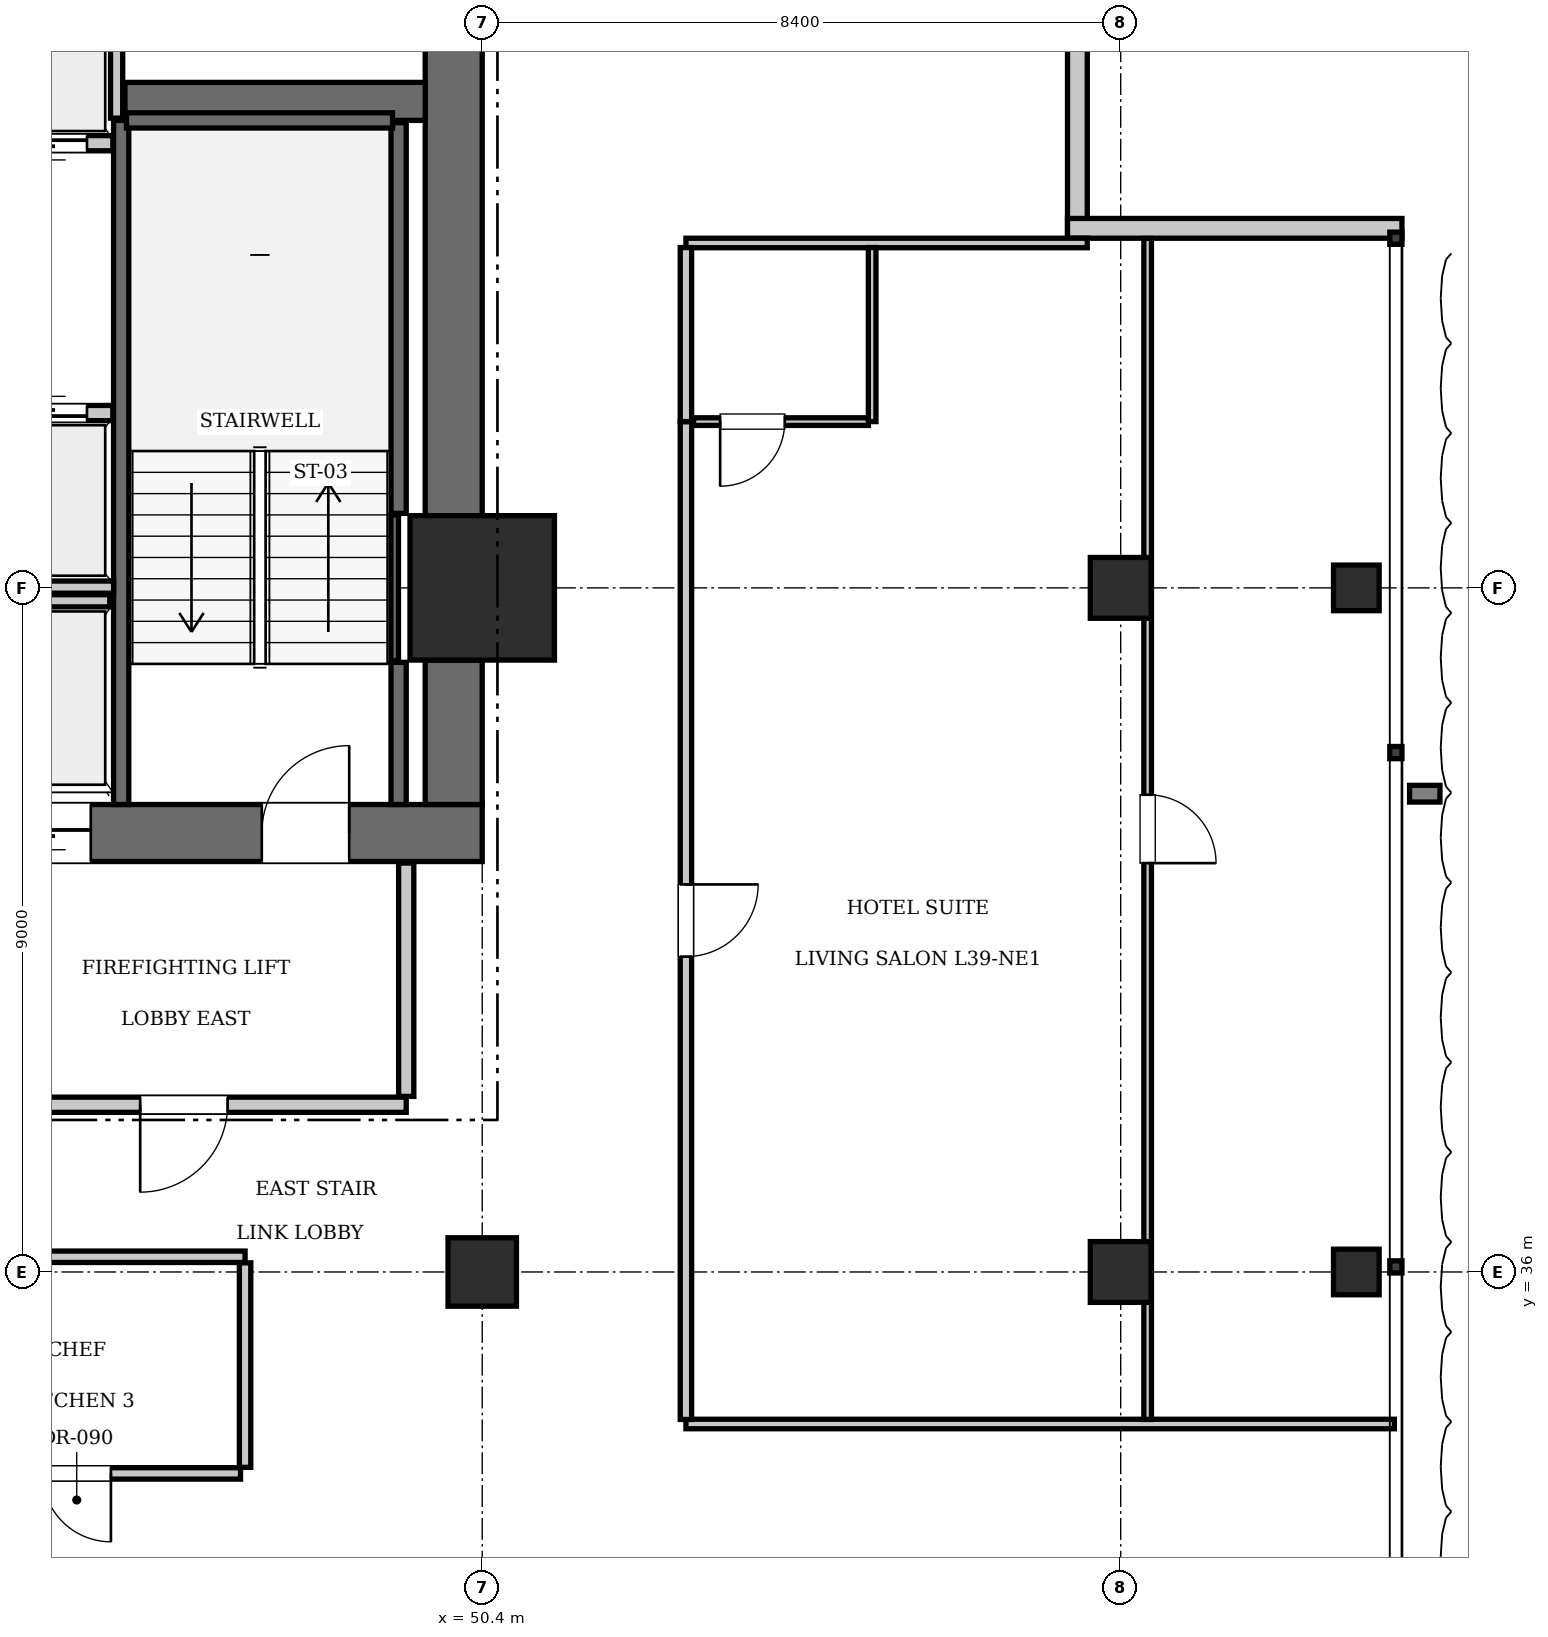
"""IFC4 building model, lengths in metres.
Left out: names, types, materials, properties, quantities, classifications, styles, units other than length and angle.
Written with IfcOpenShell. Run it as: python <this file> out.ifc"""

import sys

from ifc_helpers import new_model, si_unit, direction, frame, frame_2d, origin, origin_2d, place, context, subcontext, project, spatial, rectangle, i_section, extrude, element, fill, save


model = new_model("IFC4")
c1 = context("Model", 3, precision=1e-05, world=origin(), true_north=direction((0.0, 1.0)))
c2 = subcontext(c1, "Body", "Model", "MODEL_VIEW")
j1 = project(units=[si_unit("LENGTHUNIT", "METRE"), si_unit("PLANEANGLEUNIT", "RADIAN")], contexts=[c1])
p1 = place(None, origin())
s1 = spatial("IfcSite", under=j1, at=p1, CompositionType="ELEMENT")
p2 = place(p1, origin())
s2 = spatial("IfcBuilding", under=s1, at=p2, CompositionType="ELEMENT")
p3 = place(p2, frame((0.0, 0.0, 162.05)))
s3 = spatial("IfcBuildingStorey", under=s2, at=p3, CompositionType="ELEMENT", Elevation=162.05)
p4 = place(p3, frame((50.4, 45.0, 0.0), z_axis=(0.0, 0.0, 1.0), x_axis=(1.0, 0.0, 0.0)))
e1 = element("IfcColumn", 1, at=p4, inside=s3, PredefinedType="COLUMN", context=c2, shape_type="SweptSolid", body=[
    extrude(rectangle(XDim=1.9, YDim=1.9, at=origin_2d()), origin(), (0.0, 0.0, 1.0), 3.85),
])
p5 = place(p3, frame((43.6, 41.775, 0.0), z_axis=(0.0, 0.0, 1.0), x_axis=(1.0, 0.0, 0.0)))
e2 = element("IfcWall", 2, at=p5, inside=s3, PredefinedType="SHEAR", context=c2, shape_type="SweptSolid", body=[
    extrude(rectangle(XDim=6.8, YDim=0.75, at=frame_2d((3.4, 0.0))), origin(), (0.0, 0.0, 1.0), 3.85),
])
p6 = place(p5, frame((3.9, 0.0, 0.0)))
e3 = element("IfcOpeningElement", 3, at=p6, cuts=e2, PredefinedType="OPENING", context=c2, shape_type="SweptSolid", body=[
    extrude(rectangle(XDim=1.15, YDim=2.15, at=frame_2d((0.575, 1.075))), frame((0.0, 0.385, 0.0), z_axis=(0.0, -1.0, 0.0), x_axis=(1.0, 0.0, 0.0)), (0.0, 0.0, 1.0), 0.77),
])
p7 = place(p5, frame((0.55, 0.0, 0.0)))
e4 = element("IfcOpeningElement", 4, at=p7, cuts=e2, PredefinedType="OPENING", context=c2, shape_type="SweptSolid", body=[
    extrude(rectangle(XDim=1.1, YDim=2.2, at=frame_2d((0.55, 1.1))), frame((0.0, 0.385, 0.0), z_axis=(0.0, -1.0, 0.0), x_axis=(1.0, 0.0, 0.0)), (0.0, 0.0, 1.0), 0.77),
])
p8 = place(p3, frame((50.025, 42.15, 0.0), z_axis=(0.0, 0.0, 1.0), x_axis=(0.0, 1.0, 0.0)))
e5 = element("IfcWall", 5, at=p8, inside=s3, PredefinedType="SHEAR", context=c2, shape_type="SweptSolid", body=[
    extrude(rectangle(XDim=1.9, YDim=0.75, at=frame_2d((0.95, 0.0))), origin(), (0.0, 0.0, 1.0), 3.85),
])
p9 = place(p3, frame((50.025, 45.95, 0.0), z_axis=(0.0, 0.0, 1.0), x_axis=(0.0, 1.0, 0.0)))
e6 = element("IfcWall", 6, at=p9, inside=s3, PredefinedType="SHEAR", context=c2, shape_type="SweptSolid", body=[
    extrude(rectangle(XDim=7.3, YDim=0.75, at=frame_2d((3.65, 0.0))), origin(), (0.0, 0.0, 1.0), 3.85),
])
p10 = place(p3, frame((45.7, 51.4, 0.0), z_axis=(0.0, 0.0, 1.0), x_axis=(1.0, 0.0, 0.0)))
e7 = element("IfcWall", 7, at=p10, inside=s3, PredefinedType="SHEAR", context=c2, shape_type="SweptSolid", body=[
    extrude(rectangle(XDim=3.95, YDim=0.5, at=frame_2d((1.975, 0.0))), origin(), (0.0, 0.0, 1.0), 3.85),
])
p11 = place(p3, frame((50.4, 36.0, 0.0), z_axis=(0.0, 0.0, 1.0), x_axis=(1.0, 0.0, 0.0)))
e8 = element("IfcColumn", 8, at=p11, inside=s3, PredefinedType="COLUMN", context=c2, shape_type="SweptSolid", body=[
    extrude(rectangle(XDim=0.9, YDim=0.9, at=origin_2d()), origin(), (0.0, 0.0, 1.0), 3.85),
])
for number, where, z_axis, x_axis in (
    (9, (58.8, 36.0, 0.0), (0.0, 0.0, 1.0), (1.0, 0.0, 0.0)),
    (10, (58.8, 45.0, 0.0), (0.0, 0.0, 1.0), (1.0, 0.0, 0.0)),
):
    element("IfcColumn", number, at=place(p3, frame(where, z_axis=z_axis, x_axis=x_axis)), inside=s3, PredefinedType="COLUMN", context=c2, shape_type="SweptSolid", body=[
        extrude(rectangle(XDim=0.8, YDim=0.8, at=origin_2d()), origin(), (0.0, 0.0, 1.0), 3.85),
    ])
for number, where, z_axis, x_axis in (
    (11, (61.9, 36.0, 0.0), (0.0, 0.0, 1.0), (1.0, 0.0, 0.0)),
    (12, (61.9, 45.0, 0.0), (0.0, 0.0, 1.0), (1.0, 0.0, 0.0)),
):
    element("IfcColumn", number, at=place(p3, frame(where, z_axis=z_axis, x_axis=x_axis)), inside=s3, PredefinedType="COLUMN", context=c2, shape_type="SweptSolid", body=[
        extrude(i_section(OverallWidth=0.6, OverallDepth=0.6, WebThickness=0.025, FlangeThickness=0.038, at=origin_2d()), origin(), (0.0, 0.0, 1.0), 3.85),
    ])
p12 = place(p3, frame((45.65, 42.15, 0.0), z_axis=(0.0, 0.0, 1.0), x_axis=(0.0, 1.0, 0.0)))
e13 = element("IfcWall", 13, at=p12, inside=s3, PredefinedType="SOLIDWALL", context=c2, shape_type="SweptSolid", body=[
    extrude(rectangle(XDim=9.0, YDim=0.2, at=frame_2d((4.5, 0.0))), origin(), (0.0, 0.0, 1.0), 3.61),
])
p13 = place(p3, frame((49.3, 42.15, 0.0), z_axis=(0.0, 0.0, 1.0), x_axis=(0.0, 1.0, 0.0)))
e14 = element("IfcWall", 14, at=p13, inside=s3, PredefinedType="SOLIDWALL", context=c2, shape_type="SweptSolid", body=[
    extrude(rectangle(XDim=1.87, YDim=0.2, at=frame_2d((0.935, 0.0))), origin(), (0.0, 0.0, 1.0), 3.61),
])
p14 = place(p3, frame((49.3, 45.98, 0.0), z_axis=(0.0, 0.0, 1.0), x_axis=(0.0, 1.0, 0.0)))
e15 = element("IfcWall", 15, at=p14, inside=s3, PredefinedType="SOLIDWALL", context=c2, shape_type="SweptSolid", body=[
    extrude(rectangle(XDim=5.14, YDim=0.2, at=frame_2d((2.57, 0.0))), origin(), (0.0, 0.0, 1.0), 3.61),
])
p15 = place(p3, frame((45.72, 51.15, 0.0), z_axis=(0.0, 0.0, 1.0), x_axis=(1.0, 0.0, 0.0)))
e16 = element("IfcWall", 16, at=p15, inside=s3, PredefinedType="SOLIDWALL", context=c2, shape_type="SweptSolid", body=[
    extrude(rectangle(XDim=3.5, YDim=0.2, at=frame_2d((1.75, 0.0))), origin(), (0.0, 0.0, 1.0), 3.61),
])
p16 = place(p3, frame((49.248, 44.04, 0.0), z_axis=(0.0, 0.0, 1.0), x_axis=(0.0, 1.0, 0.0)))
e17 = element("IfcWall", 17, at=p16, inside=s3, PredefinedType="SOLIDWALL", context=c2, shape_type="SweptSolid", body=[
    extrude(rectangle(XDim=1.92, YDim=0.1, at=frame_2d((0.96, 0.0))), origin(), (0.0, 0.0, 1.0), 3.61),
])
p17 = place(p3, frame((43.86, 47.3, 0.0), z_axis=(0.0, 0.0, 1.0), x_axis=(1.0, 0.0, 0.0)))
e18 = element("IfcWall", 18, at=p17, inside=s3, PredefinedType="SOLIDWALL", context=c2, shape_type="SweptSolid", body=[
    extrude(rectangle(XDim=1.68, YDim=0.2, at=frame_2d((0.84, 0.0))), origin(), (0.0, 0.0, 1.0), 3.61),
])
p18 = place(p17, frame((0.34, 0.0, 0.0)))
e19 = element("IfcOpeningElement", 19, at=p18, cuts=e18, PredefinedType="OPENING", context=c2, shape_type="SweptSolid", body=[
    extrude(rectangle(XDim=1.0, YDim=2.15, at=frame_2d((0.5, 1.075))), frame((0.0, 0.11, 0.0), z_axis=(0.0, -1.0, 0.0), x_axis=(1.0, 0.0, 0.0)), (0.0, 0.0, 1.0), 0.22),
])
p19 = place(p3, frame((43.86, 50.85, 0.0), z_axis=(0.0, 0.0, 1.0), x_axis=(1.0, 0.0, 0.0)))
e20 = element("IfcWall", 20, at=p19, inside=s3, PredefinedType="SOLIDWALL", context=c2, shape_type="SweptSolid", body=[
    extrude(rectangle(XDim=1.68, YDim=0.2, at=frame_2d((0.84, 0.0))), origin(), (0.0, 0.0, 1.0), 3.61),
])
p20 = place(p19, frame((0.34, 0.0, 0.0)))
e21 = element("IfcOpeningElement", 21, at=p20, cuts=e20, PredefinedType="OPENING", context=c2, shape_type="SweptSolid", body=[
    extrude(rectangle(XDim=1.0, YDim=2.15, at=frame_2d((0.5, 1.075))), frame((0.0, 0.11, 0.0), z_axis=(0.0, -1.0, 0.0), x_axis=(1.0, 0.0, 0.0)), (0.0, 0.0, 1.0), 0.22),
])
p21 = place(p3, frame((43.9, 44.83, 0.0), z_axis=(0.0, 0.0, 1.0), x_axis=(1.0, 0.0, 0.0)))
e22 = element("IfcWall", 22, at=p21, inside=s3, PredefinedType="SOLIDWALL", context=c2, shape_type="SweptSolid", body=[
    extrude(rectangle(XDim=1.6, YDim=0.16, at=frame_2d((0.8, 0.0))), origin(), (0.0, 0.0, 1.0), 3.61),
])
p22 = place(p3, frame((42.1, 45.01, 0.0), z_axis=(0.0, 0.0, 1.0), x_axis=(1.0, 0.0, 0.0)))
e23 = element("IfcWall", 23, at=p22, inside=s3, PredefinedType="SOLIDWALL", context=c2, shape_type="SweptSolid", body=[
    extrude(rectangle(XDim=3.45, YDim=0.16, at=frame_2d((1.725, 0.0))), origin(), (0.0, 0.0, 1.0), 3.61),
])
p23 = place(p3, frame((45.59, 51.18, 0.0), z_axis=(0.0, 0.0, 1.0), x_axis=(0.0, 1.0, 0.0)))
e24 = element("IfcWall", 24, at=p23, inside=s3, PredefinedType="SOLIDWALL", context=c2, shape_type="SweptSolid", body=[
    extrude(rectangle(XDim=2.07, YDim=0.16, at=frame_2d((1.035, 0.0))), origin(), (0.0, 0.0, 1.0), 3.61),
])
for number, where, z_axis, x_axis in (
    (25, (58.23, 54.0, 0.0), (0.0, 0.0, 1.0), (0.0, -1.0, 0.0)),
    (26, (58.1, 49.73, 0.0), (0.0, 0.0, 1.0), (1.0, 0.0, 0.0)),
):
    element("IfcWall", number, at=place(p3, frame(where, z_axis=z_axis, x_axis=x_axis)), inside=s3, PredefinedType="SOLIDWALL", context=c2, shape_type="SweptSolid", body=[
        extrude(rectangle(XDim=4.4, YDim=0.26, at=frame_2d((2.2, 0.0))), origin(), (0.0, 0.0, 1.0), 3.61),
    ])
p24 = place(p3, frame((43.6, 38.2, 0.0), z_axis=(0.0, 0.0, 1.0), x_axis=(1.0, 0.0, 0.0)))
e27 = element("IfcWall", 27, at=p24, inside=s3, PredefinedType="PARTITIONING", context=c2, shape_type="SweptSolid", body=[
    extrude(rectangle(XDim=5.8, YDim=0.2, at=frame_2d((2.9, 0.0))), origin(), (0.0, 0.0, 1.0), 3.61),
])
p25 = place(p24, frame((2.3, 0.0, 0.0)))
e28 = element("IfcOpeningElement", 28, at=p25, cuts=e27, PredefinedType="OPENING", context=c2, shape_type="SweptSolid", body=[
    extrude(rectangle(XDim=1.15, YDim=2.15, at=frame_2d((0.575, 1.075))), frame((0.0, 0.11, 0.0), z_axis=(0.0, -1.0, 0.0), x_axis=(1.0, 0.0, 0.0)), (0.0, 0.0, 1.0), 0.22),
])
p26 = place(p3, frame((49.4, 38.31, 0.0), z_axis=(0.0, 0.0, 1.0), x_axis=(0.0, 1.0, 0.0)))
e29 = element("IfcWall", 29, at=p26, inside=s3, PredefinedType="PARTITIONING", context=c2, shape_type="SweptSolid", body=[
    extrude(rectangle(XDim=3.07, YDim=0.2, at=frame_2d((1.535, 0.0))), origin(), (0.0, 0.0, 1.0), 3.61),
])
p27 = place(p3, frame((42.85, 36.2, 0.0), z_axis=(0.0, 0.0, 1.0), x_axis=(1.0, 0.0, 0.0)))
e30 = element("IfcWall", 30, at=p27, inside=s3, PredefinedType="PARTITIONING", context=c2, shape_type="SweptSolid", body=[
    extrude(rectangle(XDim=4.43, YDim=0.15, at=frame_2d((2.215, 0.0))), origin(), (0.0, 0.0, 1.0), 3.61),
])
p28 = place(p3, frame((47.28, 33.43, 0.0), z_axis=(0.0, 0.0, 1.0), x_axis=(0.0, 1.0, 0.0)))
e31 = element("IfcWall", 31, at=p28, inside=s3, PredefinedType="PARTITIONING", context=c2, shape_type="SweptSolid", body=[
    extrude(rectangle(XDim=2.69, YDim=0.15, at=frame_2d((1.345, 0.0))), origin(), (0.0, 0.0, 1.0), 3.61),
])
p29 = place(p3, frame((42.91, 33.35, 0.0), z_axis=(0.0, 0.0, 1.0), x_axis=(1.0, 0.0, 0.0)))
e32 = element("IfcWall", 32, at=p29, inside=s3, PredefinedType="PARTITIONING", context=c2, shape_type="SweptSolid", body=[
    extrude(rectangle(XDim=4.31, YDim=0.15, at=frame_2d((2.155, 0.0))), origin(), (0.0, 0.0, 1.0), 3.61),
])
p30 = place(p29, frame((1.705, 0.0, 0.0)))
e33 = element("IfcOpeningElement", 33, at=p30, cuts=e32, PredefinedType="OPENING", context=c2, shape_type="SweptSolid", body=[
    extrude(rectangle(XDim=0.9, YDim=2.1, at=frame_2d((0.45, 1.05))), frame((0.0, 0.085, 0.0), z_axis=(0.0, -1.0, 0.0), x_axis=(1.0, 0.0, 0.0)), (0.0, 0.0, 1.0), 0.17),
])
p31 = place(p3, frame((53.08, 34.0, 0.0), z_axis=(0.0, 0.0, 1.0), x_axis=(1.0, 0.0, 0.0)))
e34 = element("IfcWall", 34, at=p31, inside=s3, PredefinedType="PARTITIONING", context=c2, shape_type="SweptSolid", body=[
    extrude(rectangle(XDim=9.32, YDim=0.125, at=frame_2d((4.66, 0.0))), origin(), (0.0, 0.0, 1.0), 3.61),
])
p32 = place(p3, frame((53.08, 49.538, 0.0), z_axis=(0.0, 0.0, 1.0), x_axis=(1.0, 0.0, 0.0)))
e35 = element("IfcWall", 35, at=p32, inside=s3, PredefinedType="PARTITIONING", context=c2, shape_type="SweptSolid", body=[
    extrude(rectangle(XDim=5.28, YDim=0.125, at=frame_2d((2.64, 0.0))), origin(), (0.0, 0.0, 1.0), 3.61),
])
p33 = place(p3, frame((53.08, 34.06, 0.0), z_axis=(0.0, 0.0, 1.0), x_axis=(0.0, 1.0, 0.0)))
e36 = element("IfcWall", 36, at=p33, inside=s3, PredefinedType="PARTITIONING", context=c2, shape_type="SweptSolid", body=[
    extrude(rectangle(XDim=13.127, YDim=0.15, at=frame_2d((6.564, 0.0))), origin(), (0.0, 0.0, 1.0), 3.61),
])
p34 = place(p33, frame((6.089, 0.0, 0.0)))
e37 = element("IfcOpeningElement", 37, at=p34, cuts=e36, PredefinedType="OPENING", context=c2, shape_type="SweptSolid", body=[
    extrude(rectangle(XDim=0.95, YDim=2.15, at=frame_2d((0.475, 1.075))), frame((0.0, 0.085, 0.0), z_axis=(0.0, -1.0, 0.0), x_axis=(1.0, 0.0, 0.0)), (0.0, 0.0, 1.0), 0.17),
])
p35 = place(p3, frame((53.08, 47.188, 0.0), z_axis=(0.0, 0.0, 1.0), x_axis=(0.0, 1.0, 0.0)))
e38 = element("IfcWall", 38, at=p35, inside=s3, PredefinedType="PARTITIONING", context=c2, shape_type="SweptSolid", body=[
    extrude(rectangle(XDim=2.29, YDim=0.15, at=frame_2d((1.145, 0.0))), origin(), (0.0, 0.0, 1.0), 3.61),
])
p36 = place(p3, frame((55.53, 47.188, 0.0), z_axis=(0.0, 0.0, 1.0), x_axis=(0.0, 1.0, 0.0)))
e39 = element("IfcWall", 39, at=p36, inside=s3, PredefinedType="PARTITIONING", context=c2, shape_type="SweptSolid", body=[
    extrude(rectangle(XDim=2.29, YDim=0.1, at=frame_2d((1.145, 0.0))), origin(), (0.0, 0.0, 1.0), 3.61),
])
p37 = place(p3, frame((53.18, 47.188, 0.0), z_axis=(0.0, 0.0, 1.0), x_axis=(1.0, 0.0, 0.0)))
e40 = element("IfcWall", 40, at=p37, inside=s3, PredefinedType="PARTITIONING", context=c2, shape_type="SweptSolid", body=[
    extrude(rectangle(XDim=2.3, YDim=0.1, at=frame_2d((1.15, 0.0))), origin(), (0.0, 0.0, 1.0), 3.61),
])
p38 = place(p37, frame((0.35, 0.0, 0.0)))
e41 = element("IfcOpeningElement", 41, at=p38, cuts=e40, PredefinedType="OPENING", context=c2, shape_type="SweptSolid", body=[
    extrude(rectangle(XDim=0.85, YDim=2.1, at=frame_2d((0.425, 1.05))), frame((0.0, 0.06, 0.0), z_axis=(0.0, -1.0, 0.0), x_axis=(1.0, 0.0, 0.0)), (0.0, 0.0, 1.0), 0.12),
])
p39 = place(p3, frame((59.154, 34.06, 0.0), z_axis=(0.0, 0.0, 1.0), x_axis=(0.0, 1.0, 0.0)))
e42 = element("IfcWall", 42, at=p39, inside=s3, PredefinedType="PARTITIONING", context=c2, shape_type="SweptSolid", body=[
    extrude(rectangle(XDim=15.537, YDim=0.1, at=frame_2d((7.769, 0.0))), origin(), (0.0, 0.0, 1.0), 3.61),
])
p40 = place(p39, frame((7.319, 0.0, 0.0)))
e43 = element("IfcOpeningElement", 43, at=p40, cuts=e42, PredefinedType="OPENING", context=c2, shape_type="SweptSolid", body=[
    extrude(rectangle(XDim=0.9, YDim=2.1, at=frame_2d((0.45, 1.05))), frame((0.0, 0.06, 0.0), z_axis=(0.0, -1.0, 0.0), x_axis=(1.0, 0.0, 0.0)), (0.0, 0.0, 1.0), 0.12),
])
p41 = place(p6, origin())
e44 = element("IfcDoor", 44, at=p41, inside=s3, OperationType="SINGLE_SWING_RIGHT", PredefinedType="DOOR", context=c2, shape_type="SweptSolid", body=[
    extrude(rectangle(XDim=1.15, YDim=2.15, at=frame_2d((0.575, 1.075))), frame((0.0, 0.025, 0.0), z_axis=(0.0, -1.0, 0.0), x_axis=(1.0, 0.0, 0.0)), (0.0, 0.0, 1.0), 0.05),
])
fill(e3, e44)
p42 = place(p18, origin())
e45 = element("IfcDoor", 45, at=p42, inside=s3, OperationType="SLIDING_TO_LEFT", PredefinedType="DOOR", context=c2, shape_type="SweptSolid", body=[
    extrude(rectangle(XDim=1.0, YDim=2.15, at=frame_2d((0.5, 1.075))), frame((0.0, 0.025, 0.0), z_axis=(0.0, -1.0, 0.0), x_axis=(1.0, 0.0, 0.0)), (0.0, 0.0, 1.0), 0.05),
])
fill(e19, e45)
p43 = place(p20, frame((1.0, 0.0, 0.0), z_axis=(0.0, 0.0, 1.0), x_axis=(-1.0, 0.0, 0.0)))
e46 = element("IfcDoor", 46, at=p43, inside=s3, OperationType="SLIDING_TO_LEFT", PredefinedType="DOOR", context=c2, shape_type="SweptSolid", body=[
    extrude(rectangle(XDim=1.0, YDim=2.15, at=frame_2d((0.5, 1.075))), frame((0.0, 0.025, 0.0), z_axis=(0.0, -1.0, 0.0), x_axis=(1.0, 0.0, 0.0)), (0.0, 0.0, 1.0), 0.05),
])
fill(e21, e46)
p44 = place(p7, frame((1.1, 0.0, 0.0), z_axis=(0.0, 0.0, 1.0), x_axis=(-1.0, 0.0, 0.0)))
e47 = element("IfcDoor", 47, at=p44, inside=s3, OperationType="SLIDING_TO_LEFT", PredefinedType="DOOR", context=c2, shape_type="SweptSolid", body=[
    extrude(rectangle(XDim=1.1, YDim=2.2, at=frame_2d((0.55, 1.1))), frame((0.0, 0.025, 0.0), z_axis=(0.0, -1.0, 0.0), x_axis=(1.0, 0.0, 0.0)), (0.0, 0.0, 1.0), 0.05),
])
fill(e4, e47)
p45 = place(p25, frame((1.15, 0.0, 0.0), z_axis=(0.0, 0.0, 1.0), x_axis=(-1.0, 0.0, 0.0)))
e48 = element("IfcDoor", 48, at=p45, inside=s3, OperationType="SINGLE_SWING_RIGHT", PredefinedType="DOOR", context=c2, shape_type="SweptSolid", body=[
    extrude(rectangle(XDim=1.15, YDim=2.15, at=frame_2d((0.575, 1.075))), frame((0.0, 0.025, 0.0), z_axis=(0.0, -1.0, 0.0), x_axis=(1.0, 0.0, 0.0)), (0.0, 0.0, 1.0), 0.05),
])
fill(e28, e48)
p46 = place(p30, frame((0.9, 0.0, 0.0), z_axis=(0.0, 0.0, 1.0), x_axis=(-1.0, 0.0, 0.0)))
e49 = element("IfcDoor", 49, at=p46, inside=s3, OperationType="SINGLE_SWING_LEFT", PredefinedType="DOOR", context=c2, shape_type="SweptSolid", body=[
    extrude(rectangle(XDim=0.9, YDim=2.1, at=frame_2d((0.45, 1.05))), frame((0.0, 0.025, 0.0), z_axis=(0.0, -1.0, 0.0), x_axis=(1.0, 0.0, 0.0)), (0.0, 0.0, 1.0), 0.05),
])
fill(e33, e49)
p47 = place(p38, frame((0.85, 0.0, 0.0), z_axis=(0.0, 0.0, 1.0), x_axis=(-1.0, 0.0, 0.0)))
e50 = element("IfcDoor", 50, at=p47, inside=s3, OperationType="SINGLE_SWING_RIGHT", PredefinedType="DOOR", context=c2, shape_type="SweptSolid", body=[
    extrude(rectangle(XDim=0.85, YDim=2.1, at=frame_2d((0.425, 1.05))), frame((0.0, 0.025, 0.0), z_axis=(0.0, -1.0, 0.0), x_axis=(1.0, 0.0, 0.0)), (0.0, 0.0, 1.0), 0.05),
])
fill(e41, e50)
p48 = place(p34, frame((0.95, 0.0, 0.0), z_axis=(0.0, 0.0, 1.0), x_axis=(-1.0, 0.0, 0.0)))
e51 = element("IfcDoor", 51, at=p48, inside=s3, OperationType="SINGLE_SWING_LEFT", PredefinedType="DOOR", context=c2, shape_type="SweptSolid", body=[
    extrude(rectangle(XDim=0.95, YDim=2.15, at=frame_2d((0.475, 1.075))), frame((0.0, 0.025, 0.0), z_axis=(0.0, -1.0, 0.0), x_axis=(1.0, 0.0, 0.0)), (0.0, 0.0, 1.0), 0.05),
])
fill(e37, e51)
p49 = place(p40, frame((0.9, 0.0, 0.0), z_axis=(0.0, 0.0, 1.0), x_axis=(-1.0, 0.0, 0.0)))
e52 = element("IfcDoor", 52, at=p49, inside=s3, OperationType="SINGLE_SWING_RIGHT", PredefinedType="DOOR", context=c2, shape_type="SweptSolid", body=[
    extrude(rectangle(XDim=0.9, YDim=2.1, at=frame_2d((0.45, 1.05))), frame((0.0, 0.025, 0.0), z_axis=(0.0, -1.0, 0.0), x_axis=(1.0, 0.0, 0.0)), (0.0, 0.0, 1.0), 0.05),
])
fill(e43, e52)
save(model, sys.argv[1])
